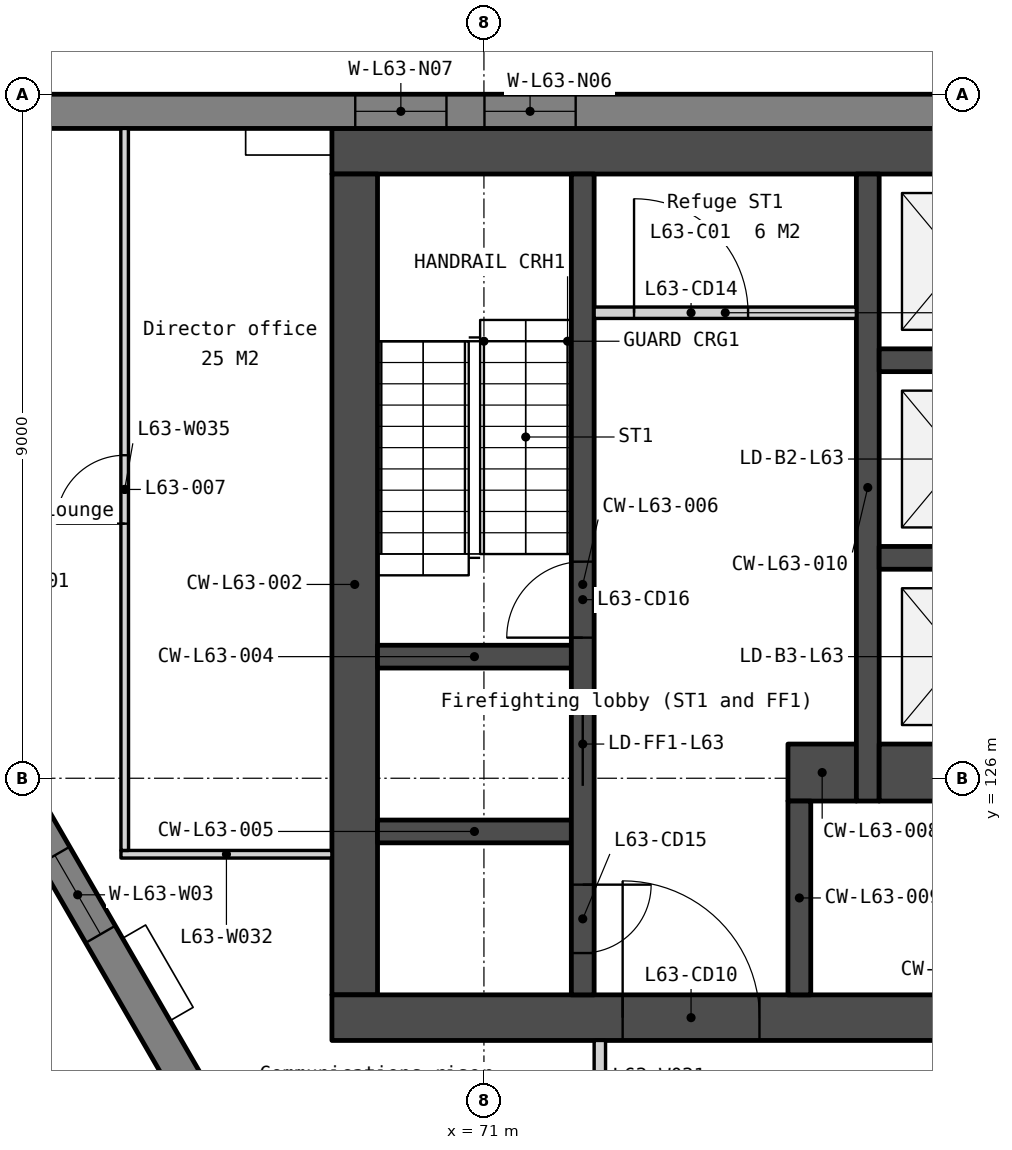
"""IFC4 building model, lengths in metres.
Left out: names, types, materials, properties, quantities, classifications, styles, units other than length and angle.
Written with IfcOpenShell. Run it as: python <this file> out.ifc"""

import sys

from ifc_helpers import new_model, si_unit, direction, frame, frame_2d, origin, place, context, subcontext, project, spatial, polyline, rectangle, outline, extrude, element, fill, save


model = new_model("IFC4")
c1 = context("Model", 3, precision=1e-05, world=origin(), true_north=direction((0.0, 1.0)))
c2 = subcontext(c1, "Body", "Model", "MODEL_VIEW")
j1 = project(units=[si_unit("LENGTHUNIT", "METRE"), si_unit("PLANEANGLEUNIT", "RADIAN")], contexts=[c1])
p1 = place(None, origin())
s1 = spatial("IfcSite", under=j1, at=p1, CompositionType="ELEMENT")
p2 = place(p1, origin())
s2 = spatial("IfcBuilding", under=s1, at=p2, CompositionType="ELEMENT")
p3 = place(p2, frame((0.0, 0.0, 258.2)))
s3 = spatial("IfcBuildingStorey", under=s2, at=p3, CompositionType="ELEMENT", Elevation=258.2)
p4 = place(p3, frame((69.0, 134.25, 0.0), z_axis=(0.0, 0.0, 1.0), x_axis=(1.0, 0.0, 0.0)))
e1 = element("IfcWall", 1, at=p4, inside=s3, PredefinedType="SOLIDWALL", context=c2, shape_type="SweptSolid", body=[
    extrude(rectangle(XDim=22.0, YDim=0.6, at=frame_2d((11.0, 0.0))), origin(), (0.0, 0.0, 1.0), 3.75),
])
p5 = place(p3, frame((69.3, 133.95, 0.0), z_axis=(0.0, 0.0, 1.0), x_axis=(0.0, -1.0, 0.0)))
e2 = element("IfcWall", 2, at=p5, inside=s3, PredefinedType="SOLIDWALL", context=c2, shape_type="SweptSolid", body=[
    extrude(rectangle(XDim=10.8, YDim=0.6, at=frame_2d((5.4, 0.0))), origin(), (0.0, 0.0, 1.0), 3.75),
])
p6 = place(p3, frame((69.0, 122.85, 0.0), z_axis=(0.0, 0.0, 1.0), x_axis=(1.0, 0.0, 0.0)))
e3 = element("IfcWall", 3, at=p6, inside=s3, PredefinedType="SOLIDWALL", context=c2, shape_type="SweptSolid", body=[
    extrude(rectangle(XDim=22.0, YDim=0.6, at=frame_2d((11.0, 0.0))), origin(), (0.0, 0.0, 1.0), 3.75),
])
p7 = place(p6, frame((16.375, 0.0, 0.0)))
e4 = element("IfcOpeningElement", 4, at=p7, cuts=e3, PredefinedType="OPENING", context=c2, shape_type="SweptSolid", body=[
    extrude(rectangle(XDim=1.8, YDim=2.1, at=frame_2d((0.9, 1.05))), frame((0.0, 0.31, 0.0), z_axis=(0.0, -1.0, 0.0), x_axis=(1.0, 0.0, 0.0)), (0.0, 0.0, 1.0), 0.62),
])
p8 = place(p6, frame((3.825, 0.0, 0.0)))
e5 = element("IfcOpeningElement", 5, at=p8, cuts=e3, PredefinedType="OPENING", context=c2, shape_type="SweptSolid", body=[
    extrude(rectangle(XDim=1.8, YDim=2.1, at=frame_2d((0.9, 1.05))), frame((0.0, 0.31, 0.0), z_axis=(0.0, -1.0, 0.0), x_axis=(1.0, 0.0, 0.0)), (0.0, 0.0, 1.0), 0.62),
])
p9 = place(p6, frame((12.85, 0.0, 0.0)))
e6 = element("IfcOpeningElement", 6, at=p9, cuts=e3, PredefinedType="OPENING", context=c2, shape_type="SweptSolid", body=[
    extrude(rectangle(XDim=1.5, YDim=2.1, at=frame_2d((0.75, 1.05))), frame((0.0, 0.31, 0.0), z_axis=(0.0, -1.0, 0.0), x_axis=(1.0, 0.0, 0.0)), (0.0, 0.0, 1.0), 0.62),
])
for number, where, z_axis, x_axis in (
    (7, (69.6, 127.6, 0.0), (0.0, 0.0, 1.0), (1.0, 0.0, 0.0)),
    (8, (69.6, 125.3, 0.0), (0.0, 0.0, 1.0), (1.0, 0.0, 0.0)),
):
    element("IfcWall", number, at=place(p3, frame(where, z_axis=z_axis, x_axis=x_axis)), inside=s3, PredefinedType="SOLIDWALL", context=c2, shape_type="SweptSolid", body=[
        extrude(rectangle(XDim=2.55, YDim=0.3, at=frame_2d((1.275, 0.0))), origin(), (0.0, 0.0, 1.0), 3.75),
    ])
p10 = place(p3, frame((72.3, 133.95, 0.0), z_axis=(0.0, 0.0, 1.0), x_axis=(0.0, -1.0, 0.0)))
e9 = element("IfcWall", 9, at=p10, inside=s3, PredefinedType="SOLIDWALL", context=c2, shape_type="SweptSolid", body=[
    extrude(rectangle(XDim=10.8, YDim=0.3, at=frame_2d((5.4, 0.0))), origin(), (0.0, 0.0, 1.0), 3.75),
])
p11 = place(p10, frame((6.95, 0.0, 0.0)))
e10 = element("IfcOpeningElement", 10, at=p11, cuts=e9, PredefinedType="OPENING", context=c2, shape_type="SweptSolid", body=[
    extrude(rectangle(XDim=1.1, YDim=2.1, at=frame_2d((0.55, 1.05))), frame((0.0, 0.16, 0.0), z_axis=(0.0, -1.0, 0.0), x_axis=(1.0, 0.0, 0.0)), (0.0, 0.0, 1.0), 0.32),
])
p12 = place(p10, frame((9.35, 0.0, 0.0)))
e11 = element("IfcOpeningElement", 11, at=p12, cuts=e9, PredefinedType="OPENING", context=c2, shape_type="SweptSolid", body=[
    extrude(rectangle(XDim=0.9, YDim=2.1, at=frame_2d((0.45, 1.05))), frame((0.0, 0.16, 0.0), z_axis=(0.0, -1.0, 0.0), x_axis=(1.0, 0.0, 0.0)), (0.0, 0.0, 1.0), 0.32),
])
p13 = place(p10, frame((5.1, 0.0, 0.0)))
e12 = element("IfcOpeningElement", 12, at=p13, cuts=e9, PredefinedType="OPENING", context=c2, shape_type="SweptSolid", body=[
    extrude(rectangle(XDim=1.0, YDim=2.1, at=frame_2d((0.5, 1.05))), frame((0.0, 0.16, 0.0), z_axis=(0.0, -1.0, 0.0), x_axis=(1.0, 0.0, 0.0)), (0.0, 0.0, 1.0), 0.32),
])
p14 = place(p3, frame((72.45, 132.125, 0.0), z_axis=(0.0, 0.0, 1.0), x_axis=(1.0, 0.0, 0.0)))
e13 = element("IfcWall", 13, at=p14, inside=s3, PredefinedType="PARTITIONING", context=c2, shape_type="SweptSolid", body=[
    extrude(rectangle(XDim=3.45, YDim=0.15, at=frame_2d((1.725, 0.0))), origin(), (0.0, 0.0, 1.0), 3.75),
])
p15 = place(p14, frame((0.525, 0.0, 0.0)))
e14 = element("IfcOpeningElement", 14, at=p15, cuts=e13, PredefinedType="OPENING", context=c2, shape_type="SweptSolid", body=[
    extrude(rectangle(XDim=1.5, YDim=2.1, at=frame_2d((0.75, 1.05))), frame((0.0, 0.085, 0.0), z_axis=(0.0, -1.0, 0.0), x_axis=(1.0, 0.0, 0.0)), (0.0, 0.0, 1.0), 0.17),
])
p16 = place(p3, frame((75.0, 126.075, 0.0), z_axis=(0.0, 0.0, 1.0), x_axis=(1.0, 0.0, 0.0)))
e15 = element("IfcWall", 15, at=p16, inside=s3, PredefinedType="SOLIDWALL", context=c2, shape_type="SweptSolid", body=[
    extrude(rectangle(XDim=0.9, YDim=0.75, at=frame_2d((0.45, 0.0))), origin(), (0.0, 0.0, 1.0), 3.75),
])
p17 = place(p3, frame((75.15, 125.7, 0.0), z_axis=(0.0, 0.0, 1.0), x_axis=(0.0, -1.0, 0.0)))
e16 = element("IfcWall", 16, at=p17, inside=s3, PredefinedType="SOLIDWALL", context=c2, shape_type="SweptSolid", body=[
    extrude(rectangle(XDim=2.55, YDim=0.3, at=frame_2d((1.275, 0.0))), origin(), (0.0, 0.0, 1.0), 3.75),
])
p18 = place(p3, frame((76.05, 133.95, 0.0), z_axis=(0.0, 0.0, 1.0), x_axis=(0.0, -1.0, 0.0)))
e17 = element("IfcWall", 17, at=p18, inside=s3, PredefinedType="SOLIDWALL", context=c2, shape_type="SweptSolid", body=[
    extrude(rectangle(XDim=8.25, YDim=0.3, at=frame_2d((4.125, 0.0))), origin(), (0.0, 0.0, 1.0), 3.75),
])
for number, where, z_axis, x_axis in (
    (18, (76.2, 131.5, 0.0), (0.0, 0.0, 1.0), (1.0, 0.0, 0.0)),
    (19, (76.2, 128.9, 0.0), (0.0, 0.0, 1.0), (1.0, 0.0, 0.0)),
):
    element("IfcWall", number, at=place(p3, frame(where, z_axis=z_axis, x_axis=x_axis)), inside=s3, PredefinedType="SOLIDWALL", context=c2, shape_type="SweptSolid", body=[
        extrude(rectangle(XDim=2.1, YDim=0.3, at=frame_2d((1.05, 0.0))), origin(), (0.0, 0.0, 1.0), 3.75),
    ])
p19 = place(p3, frame((76.2, 126.075, 0.0), z_axis=(0.0, 0.0, 1.0), x_axis=(1.0, 0.0, 0.0)))
e20 = element("IfcWall", 20, at=p19, inside=s3, PredefinedType="SOLIDWALL", context=c2, shape_type="SweptSolid", body=[
    extrude(rectangle(XDim=2.1, YDim=0.75, at=frame_2d((1.05, 0.0))), origin(), (0.0, 0.0, 1.0), 3.75),
])
p20 = place(p3, frame((98.486, 134.775, -0.15), z_axis=(0.0, 0.0, 1.0), x_axis=(-1.0, 0.0, 0.0)))
e21 = element("IfcWall", 21, at=p20, inside=s3, PredefinedType="SOLIDWALL", context=c2, shape_type="SweptSolid", body=[
    extrude(outline(polyline([(36.972, 0.0), (36.972, 3.9), (0.0, 3.9), (0.0, 0.0), (36.972, 0.0)])), frame((0.0, 0.225, 0.0), z_axis=(0.0, -1.0, 0.0), x_axis=(1.0, 0.0, 0.0)), (0.0, 0.0, 1.0), 0.45),
])
p21 = place(p20, frame((0.715, 0.0, 0.95)))
e22 = element("IfcOpeningElement", 22, at=p21, cuts=e21, PredefinedType="OPENING", context=c2, shape_type="SweptSolid", body=[
    extrude(rectangle(XDim=1.2, YDim=2.2, at=frame_2d((0.6, 1.1))), frame((0.0, 0.235, 0.0), z_axis=(0.0, -1.0, 0.0), x_axis=(1.0, 0.0, 0.0)), (0.0, 0.0, 1.0), 0.47),
])
p22 = place(p20, frame((7.793, 0.0, 0.95)))
e23 = element("IfcOpeningElement", 23, at=p22, cuts=e21, PredefinedType="OPENING", context=c2, shape_type="SweptSolid", body=[
    extrude(rectangle(XDim=1.2, YDim=2.2, at=frame_2d((0.6, 1.1))), frame((0.0, 0.235, 0.0), z_axis=(0.0, -1.0, 0.0), x_axis=(1.0, 0.0, 0.0)), (0.0, 0.0, 1.0), 0.47),
])
p23 = place(p20, frame((9.493, 0.0, 0.95)))
e24 = element("IfcOpeningElement", 24, at=p23, cuts=e21, PredefinedType="OPENING", context=c2, shape_type="SweptSolid", body=[
    extrude(rectangle(XDim=1.2, YDim=2.2, at=frame_2d((0.6, 1.1))), frame((0.0, 0.235, 0.0), z_axis=(0.0, -1.0, 0.0), x_axis=(1.0, 0.0, 0.0)), (0.0, 0.0, 1.0), 0.47),
])
p24 = place(p20, frame((17.036, 0.0, 0.95)))
e25 = element("IfcOpeningElement", 25, at=p24, cuts=e21, PredefinedType="OPENING", context=c2, shape_type="SweptSolid", body=[
    extrude(rectangle(XDim=1.2, YDim=2.2, at=frame_2d((0.6, 1.1))), frame((0.0, 0.235, 0.0), z_axis=(0.0, -1.0, 0.0), x_axis=(1.0, 0.0, 0.0)), (0.0, 0.0, 1.0), 0.47),
])
p25 = place(p20, frame((18.736, 0.0, 0.95)))
e26 = element("IfcOpeningElement", 26, at=p25, cuts=e21, PredefinedType="OPENING", context=c2, shape_type="SweptSolid", body=[
    extrude(rectangle(XDim=1.2, YDim=2.2, at=frame_2d((0.6, 1.1))), frame((0.0, 0.235, 0.0), z_axis=(0.0, -1.0, 0.0), x_axis=(1.0, 0.0, 0.0)), (0.0, 0.0, 1.0), 0.47),
])
p26 = place(p20, frame((26.279, 0.0, 0.95)))
e27 = element("IfcOpeningElement", 27, at=p26, cuts=e21, PredefinedType="OPENING", context=c2, shape_type="SweptSolid", body=[
    extrude(rectangle(XDim=1.2, YDim=2.2, at=frame_2d((0.6, 1.1))), frame((0.0, 0.235, 0.0), z_axis=(0.0, -1.0, 0.0), x_axis=(1.0, 0.0, 0.0)), (0.0, 0.0, 1.0), 0.47),
])
p27 = place(p20, frame((27.979, 0.0, 0.95)))
e28 = element("IfcOpeningElement", 28, at=p27, cuts=e21, PredefinedType="OPENING", context=c2, shape_type="SweptSolid", body=[
    extrude(rectangle(XDim=1.2, YDim=2.2, at=frame_2d((0.6, 1.1))), frame((0.0, 0.235, 0.0), z_axis=(0.0, -1.0, 0.0), x_axis=(1.0, 0.0, 0.0)), (0.0, 0.0, 1.0), 0.47),
])
p28 = place(p20, frame((35.058, 0.0, 0.95)))
e29 = element("IfcOpeningElement", 29, at=p28, cuts=e21, PredefinedType="OPENING", context=c2, shape_type="SweptSolid", body=[
    extrude(rectangle(XDim=1.2, YDim=2.2, at=frame_2d((0.6, 1.1))), frame((0.0, 0.235, 0.0), z_axis=(0.0, -1.0, 0.0), x_axis=(1.0, 0.0, 0.0)), (0.0, 0.0, 1.0), 0.47),
])
p29 = place(p3, frame((60.609, 133.207, -0.15), z_axis=(0.0, 0.0, 1.0), x_axis=(0.499996022837, -0.866027699989, 0.0)))
e30 = element("IfcWall", 30, at=p29, inside=s3, PredefinedType="SOLIDWALL", context=c2, shape_type="SweptSolid", body=[
    extrude(outline(polyline([(0.0, 0.0), (0.0, 3.9), (16.686, 3.9), (16.686, 0.0), (0.0, 0.0)])), frame((0.0, 0.225, 0.0), z_axis=(0.0, -1.0, 0.0), x_axis=(1.0, 0.0, 0.0)), (0.0, 0.0, 1.0), 0.45),
])
p30 = place(p29, frame((0.715, 0.0, 0.95)))
e31 = element("IfcOpeningElement", 31, at=p30, cuts=e30, PredefinedType="OPENING", context=c2, shape_type="SweptSolid", body=[
    extrude(rectangle(XDim=1.2, YDim=2.2, at=frame_2d((0.6, 1.1))), frame((0.0, 0.235, 0.0), z_axis=(0.0, -1.0, 0.0), x_axis=(1.0, 0.0, 0.0)), (0.0, 0.0, 1.0), 0.47),
])
p31 = place(p29, frame((7.793, 0.0, 0.95)))
e32 = element("IfcOpeningElement", 32, at=p31, cuts=e30, PredefinedType="OPENING", context=c2, shape_type="SweptSolid", body=[
    extrude(rectangle(XDim=1.2, YDim=2.2, at=frame_2d((0.6, 1.1))), frame((0.0, 0.235, 0.0), z_axis=(0.0, -1.0, 0.0), x_axis=(1.0, 0.0, 0.0)), (0.0, 0.0, 1.0), 0.47),
])
p32 = place(p29, frame((9.493, 0.0, 0.95)))
e33 = element("IfcOpeningElement", 33, at=p32, cuts=e30, PredefinedType="OPENING", context=c2, shape_type="SweptSolid", body=[
    extrude(rectangle(XDim=1.2, YDim=2.2, at=frame_2d((0.6, 1.1))), frame((0.0, 0.235, 0.0), z_axis=(0.0, -1.0, 0.0), x_axis=(1.0, 0.0, 0.0)), (0.0, 0.0, 1.0), 0.47),
])
p33 = place(p3, frame((72.525, 120.038, 0.0), z_axis=(0.0, 0.0, 1.0), x_axis=(0.0, 1.0, 0.0)))
e34 = element("IfcWall", 34, at=p33, inside=s3, PredefinedType="PARTITIONING", context=c2, shape_type="SweptSolid", body=[
    extrude(rectangle(XDim=2.512, YDim=0.15, at=frame_2d((1.256, 0.0))), origin(), (0.0, 0.0, 1.0), 3.75),
])
p34 = place(p33, frame((0.756, 0.0, 0.0)))
e35 = element("IfcOpeningElement", 35, at=p34, cuts=e34, PredefinedType="OPENING", context=c2, shape_type="SweptSolid", body=[
    extrude(rectangle(XDim=1.0, YDim=2.1, at=frame_2d((0.5, 1.05))), frame((0.0, 0.085, 0.0), z_axis=(0.0, -1.0, 0.0), x_axis=(1.0, 0.0, 0.0)), (0.0, 0.0, 1.0), 0.17),
])
p35 = place(p3, frame((66.224, 125.0, 0.0), z_axis=(0.0, 0.0, 1.0), x_axis=(1.0, 0.0, 0.0)))
e36 = element("IfcWall", 36, at=p35, inside=s3, PredefinedType="PARTITIONING", context=c2, shape_type="SweptSolid", body=[
    extrude(rectangle(XDim=2.776, YDim=0.1, at=frame_2d((1.388, 0.0))), origin(), (0.0, 0.0, 1.0), 3.75),
])
p36 = place(p3, frame((66.274, 125.05, 0.0), z_axis=(0.0, 0.0, 1.0), x_axis=(-0.000231291112, 0.999999973252, 0.0)))
e37 = element("IfcWall", 37, at=p36, inside=s3, PredefinedType="PARTITIONING", context=c2, shape_type="SweptSolid", body=[
    extrude(rectangle(XDim=9.5, YDim=0.1, at=frame_2d((4.75, 0.0))), origin(), (0.0, 0.0, 1.0), 3.75),
])
p37 = place(p36, frame((4.3, 0.0, 0.0)))
e38 = element("IfcOpeningElement", 38, at=p37, cuts=e37, PredefinedType="OPENING", context=c2, shape_type="SweptSolid", body=[
    extrude(rectangle(XDim=0.9, YDim=2.1, at=frame_2d((0.45, 1.05))), frame((0.0, 0.06, 0.0), z_axis=(0.0, -1.0, 0.0), x_axis=(1.0, 0.0, 0.0)), (0.0, 0.0, 1.0), 0.12),
])
p38 = place(p11, origin())
e39 = element("IfcDoor", 39, at=p38, inside=s3, OperationType="SLIDING_TO_LEFT", PredefinedType="DOOR", context=c2, shape_type="SweptSolid", body=[
    extrude(rectangle(XDim=1.1, YDim=2.1, at=frame_2d((0.55, 1.05))), frame((0.0, 0.025, 0.0), z_axis=(0.0, -1.0, 0.0), x_axis=(1.0, 0.0, 0.0)), (0.0, 0.0, 1.0), 0.05),
])
fill(e10, e39)
p39 = place(p8, origin())
e40 = element("IfcDoor", 40, at=p39, inside=s3, OperationType="DOUBLE_DOOR_DOUBLE_SWING", PredefinedType="DOOR", context=c2, shape_type="SweptSolid", body=[
    extrude(rectangle(XDim=1.8, YDim=2.1, at=frame_2d((0.9, 1.05))), frame((0.0, 0.025, 0.0), z_axis=(0.0, -1.0, 0.0), x_axis=(1.0, 0.0, 0.0)), (0.0, 0.0, 1.0), 0.05),
])
fill(e5, e40)
p40 = place(p15, origin())
e41 = element("IfcDoor", 41, at=p40, inside=s3, OperationType="DOUBLE_DOOR_DOUBLE_SWING", PredefinedType="DOOR", context=c2, shape_type="SweptSolid", body=[
    extrude(rectangle(XDim=1.5, YDim=2.1, at=frame_2d((0.75, 1.05))), frame((0.0, 0.025, 0.0), z_axis=(0.0, -1.0, 0.0), x_axis=(1.0, 0.0, 0.0)), (0.0, 0.0, 1.0), 0.05),
])
fill(e14, e41)
p41 = place(p12, origin())
e42 = element("IfcDoor", 42, at=p41, inside=s3, OperationType="SINGLE_SWING_LEFT", PredefinedType="DOOR", context=c2, shape_type="SweptSolid", body=[
    extrude(rectangle(XDim=0.9, YDim=2.1, at=frame_2d((0.45, 1.05))), frame((0.0, 0.025, 0.0), z_axis=(0.0, -1.0, 0.0), x_axis=(1.0, 0.0, 0.0)), (0.0, 0.0, 1.0), 0.05),
])
fill(e11, e42)
p42 = place(p13, origin())
e43 = element("IfcDoor", 43, at=p42, inside=s3, OperationType="SINGLE_SWING_RIGHT", PredefinedType="DOOR", context=c2, shape_type="SweptSolid", body=[
    extrude(rectangle(XDim=1.0, YDim=2.1, at=frame_2d((0.5, 1.05))), frame((0.0, 0.025, 0.0), z_axis=(0.0, -1.0, 0.0), x_axis=(1.0, 0.0, 0.0)), (0.0, 0.0, 1.0), 0.05),
])
fill(e12, e43)
p43 = place(p26, origin())
e44 = element("IfcWindow", 44, at=p43, inside=s3, PartitioningType="SINGLE_PANEL", PredefinedType="WINDOW", context=c2, shape_type="SweptSolid", body=[
    extrude(rectangle(XDim=1.2, YDim=2.2, at=frame_2d((0.6, 1.1))), frame((0.0, 0.03, 0.0), z_axis=(0.0, -1.0, 0.0), x_axis=(1.0, 0.0, 0.0)), (0.0, 0.0, 1.0), 0.06),
])
fill(e27, e44)
p44 = place(p27, origin())
e45 = element("IfcWindow", 45, at=p44, inside=s3, PartitioningType="SINGLE_PANEL", PredefinedType="WINDOW", context=c2, shape_type="SweptSolid", body=[
    extrude(rectangle(XDim=1.2, YDim=2.2, at=frame_2d((0.6, 1.1))), frame((0.0, 0.03, 0.0), z_axis=(0.0, -1.0, 0.0), x_axis=(1.0, 0.0, 0.0)), (0.0, 0.0, 1.0), 0.06),
])
fill(e28, e45)
p45 = place(p32, origin())
e46 = element("IfcWindow", 46, at=p45, inside=s3, PartitioningType="SINGLE_PANEL", PredefinedType="WINDOW", context=c2, shape_type="SweptSolid", body=[
    extrude(rectangle(XDim=1.2, YDim=2.2, at=frame_2d((0.6, 1.1))), frame((0.0, 0.03, 0.0), z_axis=(0.0, -1.0, 0.0), x_axis=(1.0, 0.0, 0.0)), (0.0, 0.0, 1.0), 0.06),
])
fill(e33, e46)
p46 = place(p37, origin())
e47 = element("IfcDoor", 47, at=p46, inside=s3, OperationType="SINGLE_SWING_LEFT", PredefinedType="DOOR", context=c2, shape_type="SweptSolid", body=[
    extrude(rectangle(XDim=0.9, YDim=2.1, at=frame_2d((0.45, 1.05))), frame((0.0, 0.025, 0.0), z_axis=(0.0, -1.0, 0.0), x_axis=(1.0, 0.0, 0.0)), (0.0, 0.0, 1.0), 0.05),
])
fill(e38, e47)
save(model, sys.argv[1])
